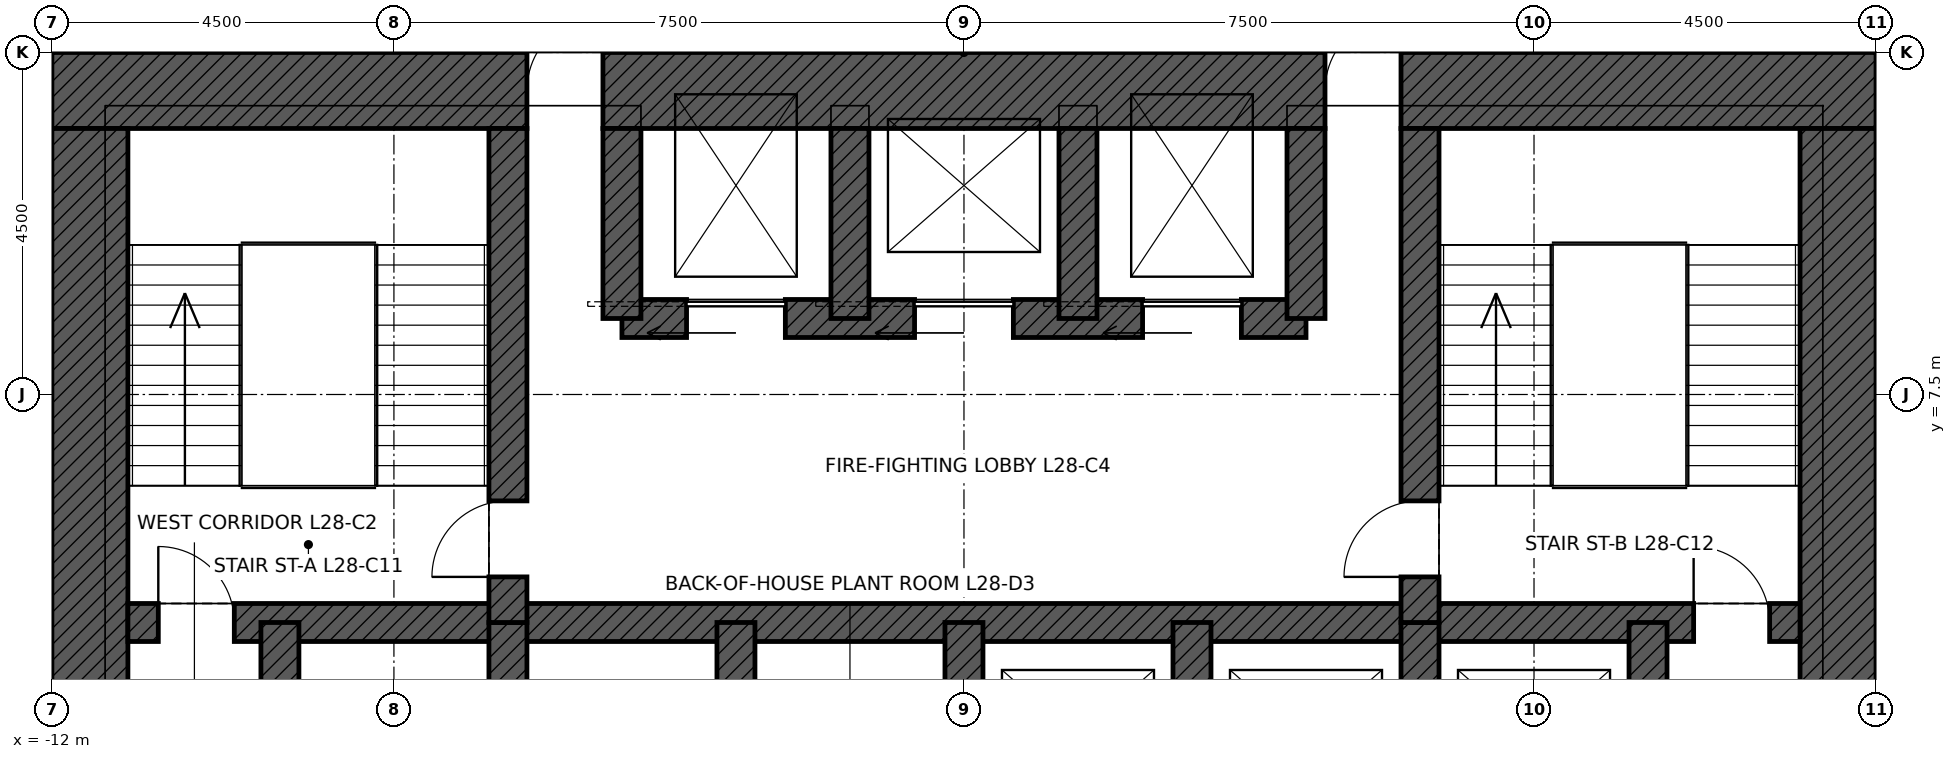
"""IFC4 building model, lengths in metres.
Left out: names, types, materials, properties, quantities, classifications, styles, units other than length and angle.
Written with IfcOpenShell. Run it as: python <this file> out.ifc"""

import sys

from ifc_helpers import new_model, si_unit, direction, frame, frame_2d, origin, place, context, subcontext, project, spatial, rectangle, extrude, element, fill, save


model = new_model("IFC4")
c1 = context("Model", 3, precision=1e-05, world=origin(), true_north=direction((0.0, 1.0)))
c2 = subcontext(c1, "Body", "Model", "MODEL_VIEW")
j1 = project(units=[si_unit("LENGTHUNIT", "METRE"), si_unit("PLANEANGLEUNIT", "RADIAN")], contexts=[c1])
p1 = place(None, origin())
s1 = spatial("IfcSite", under=j1, at=p1, CompositionType="ELEMENT")
p2 = place(p1, origin())
s2 = spatial("IfcBuilding", under=s1, at=p2, CompositionType="ELEMENT")
p3 = place(p2, frame((0.0, 0.0, 140.4)))
s3 = spatial("IfcBuildingStorey", under=s2, at=p3, CompositionType="ELEMENT", Elevation=140.4)
p4 = place(p3, frame((-12.0, 11.5, 0.0), z_axis=(0.0, 0.0, 1.0), x_axis=(1.0, 0.0, 0.0)))
e1 = element("IfcWall", 1, at=p4, inside=s3, PredefinedType="SHEAR", context=c2, shape_type="SweptSolid", body=[
    extrude(rectangle(XDim=24.0, YDim=1.0, at=frame_2d((12.0, 0.0))), origin(), (0.0, 0.0, 1.0), 4.5),
])
p5 = place(p4, frame((6.25, 0.0, 0.0)))
e2 = element("IfcOpeningElement", 2, at=p5, cuts=e1, PredefinedType="OPENING", context=c2, shape_type="SweptSolid", body=[
    extrude(rectangle(XDim=1.0, YDim=2.4, at=frame_2d((0.5, 1.2))), frame((0.0, 0.51, 0.0), z_axis=(0.0, -1.0, 0.0), x_axis=(1.0, 0.0, 0.0)), (0.0, 0.0, 1.0), 1.02),
])
p6 = place(p4, frame((16.75, 0.0, 0.0)))
e3 = element("IfcOpeningElement", 3, at=p6, cuts=e1, PredefinedType="OPENING", context=c2, shape_type="SweptSolid", body=[
    extrude(rectangle(XDim=1.0, YDim=2.4, at=frame_2d((0.5, 1.2))), frame((0.0, 0.51, 0.0), z_axis=(0.0, -1.0, 0.0), x_axis=(1.0, 0.0, 0.0)), (0.0, 0.0, 1.0), 1.02),
])
p7 = place(p3, frame((11.5, 11.0, 0.0), z_axis=(0.0, 0.0, 1.0), x_axis=(0.0, -1.0, 0.0)))
e4 = element("IfcWall", 4, at=p7, inside=s3, PredefinedType="SHEAR", context=c2, shape_type="SweptSolid", body=[
    extrude(rectangle(XDim=22.0, YDim=1.0, at=frame_2d((11.0, 0.0))), origin(), (0.0, 0.0, 1.0), 4.5),
])
p8 = place(p7, frame((10.5, 0.0, 0.0)))
e5 = element("IfcOpeningElement", 5, at=p8, cuts=e4, PredefinedType="OPENING", context=c2, shape_type="SweptSolid", body=[
    extrude(rectangle(XDim=1.0, YDim=2.4, at=frame_2d((0.5, 1.2))), frame((0.0, 0.51, 0.0), z_axis=(0.0, -1.0, 0.0), x_axis=(1.0, 0.0, 0.0)), (0.0, 0.0, 1.0), 1.02),
])
p9 = place(p3, frame((-11.5, -11.0, 0.0), z_axis=(0.0, 0.0, 1.0), x_axis=(0.0, 1.0, 0.0)))
e6 = element("IfcWall", 6, at=p9, inside=s3, PredefinedType="SHEAR", context=c2, shape_type="SweptSolid", body=[
    extrude(rectangle(XDim=22.0, YDim=1.0, at=frame_2d((11.0, 0.0))), origin(), (0.0, 0.0, 1.0), 4.5),
])
p10 = place(p9, frame((10.5, 0.0, 0.0)))
e7 = element("IfcOpeningElement", 7, at=p10, cuts=e6, PredefinedType="OPENING", context=c2, shape_type="SweptSolid", body=[
    extrude(rectangle(XDim=1.0, YDim=2.4, at=frame_2d((0.5, 1.2))), frame((0.0, 0.51, 0.0), z_axis=(0.0, -1.0, 0.0), x_axis=(1.0, 0.0, 0.0)), (0.0, 0.0, 1.0), 1.02),
])
p11 = place(p3, frame((-11.0, 4.5, 0.0), z_axis=(0.0, 0.0, 1.0), x_axis=(1.0, 0.0, 0.0)))
e8 = element("IfcWall", 8, at=p11, inside=s3, PredefinedType="SHEAR", context=c2, shape_type="SweptSolid", body=[
    extrude(rectangle(XDim=22.0, YDim=0.5, at=frame_2d((11.0, 0.0))), origin(), (0.0, 0.0, 1.0), 4.5),
])
p12 = place(p11, frame((0.4, 0.0, 0.0)))
e9 = element("IfcOpeningElement", 9, at=p12, cuts=e8, PredefinedType="OPENING", context=c2, shape_type="SweptSolid", body=[
    extrude(rectangle(XDim=1.0, YDim=2.1, at=frame_2d((0.5, 1.05))), frame((0.0, 0.26, 0.0), z_axis=(0.0, -1.0, 0.0), x_axis=(1.0, 0.0, 0.0)), (0.0, 0.0, 1.0), 0.52),
])
p13 = place(p11, frame((20.6, 0.0, 0.0)))
e10 = element("IfcOpeningElement", 10, at=p13, cuts=e8, PredefinedType="OPENING", context=c2, shape_type="SweptSolid", body=[
    extrude(rectangle(XDim=1.0, YDim=2.1, at=frame_2d((0.5, 1.05))), frame((0.0, 0.26, 0.0), z_axis=(0.0, -1.0, 0.0), x_axis=(1.0, 0.0, 0.0)), (0.0, 0.0, 1.0), 0.52),
])
p14 = place(p3, frame((-4.5, 8.5, 0.0), z_axis=(0.0, 0.0, 1.0), x_axis=(1.0, 0.0, 0.0)))
e11 = element("IfcWall", 11, at=p14, inside=s3, PredefinedType="SHEAR", context=c2, shape_type="SweptSolid", body=[
    extrude(rectangle(XDim=9.0, YDim=0.5, at=frame_2d((4.5, 0.0))), origin(), (0.0, 0.0, 1.0), 4.5),
])
p15 = place(p14, frame((0.85, 0.0, 0.0)))
e12 = element("IfcOpeningElement", 12, at=p15, cuts=e11, PredefinedType="OPENING", context=c2, shape_type="SweptSolid", body=[
    extrude(rectangle(XDim=1.3, YDim=2.4, at=frame_2d((0.65, 1.2))), frame((0.0, 0.26, 0.0), z_axis=(0.0, -1.0, 0.0), x_axis=(1.0, 0.0, 0.0)), (0.0, 0.0, 1.0), 0.52),
])
p16 = place(p14, frame((6.85, 0.0, 0.0)))
e13 = element("IfcOpeningElement", 13, at=p16, cuts=e11, PredefinedType="OPENING", context=c2, shape_type="SweptSolid", body=[
    extrude(rectangle(XDim=1.3, YDim=2.4, at=frame_2d((0.65, 1.2))), frame((0.0, 0.26, 0.0), z_axis=(0.0, -1.0, 0.0), x_axis=(1.0, 0.0, 0.0)), (0.0, 0.0, 1.0), 0.52),
])
p17 = place(p14, frame((3.85, 0.0, 0.0)))
e14 = element("IfcOpeningElement", 14, at=p17, cuts=e11, PredefinedType="OPENING", context=c2, shape_type="SweptSolid", body=[
    extrude(rectangle(XDim=1.3, YDim=2.4, at=frame_2d((0.65, 1.2))), frame((0.0, 0.26, 0.0), z_axis=(0.0, -1.0, 0.0), x_axis=(1.0, 0.0, 0.0)), (0.0, 0.0, 1.0), 0.52),
])
for number, where, z_axis, x_axis in (
    (15, (-9.0, 1.5, 0.0), (0.0, 0.0, 1.0), (0.0, 1.0, 0.0)),
    (16, (9.0, 1.5, 0.0), (0.0, 0.0, 1.0), (0.0, 1.0, 0.0)),
    (17, (-6.0, 1.5, 0.0), (0.0, 0.0, 1.0), (0.0, 1.0, 0.0)),
    (18, (-3.0, 1.5, 0.0), (0.0, 0.0, 1.0), (0.0, 1.0, 0.0)),
    (19, (0.0, 1.5, 0.0), (0.0, 0.0, 1.0), (0.0, 1.0, 0.0)),
    (20, (3.0, 1.5, 0.0), (0.0, 0.0, 1.0), (0.0, 1.0, 0.0)),
    (21, (6.0, 1.5, 0.0), (0.0, 0.0, 1.0), (0.0, 1.0, 0.0)),
):
    element("IfcWall", number, at=place(p3, frame(where, z_axis=z_axis, x_axis=x_axis)), inside=s3, PredefinedType="SHEAR", context=c2, shape_type="SweptSolid", body=[
        extrude(rectangle(XDim=3.0, YDim=0.5, at=frame_2d((1.5, 0.0))), origin(), (0.0, 0.0, 1.0), 4.5),
    ])
p18 = place(p3, frame((-6.0, 4.5, 0.0), z_axis=(0.0, 0.0, 1.0), x_axis=(0.0, 1.0, 0.0)))
e22 = element("IfcWall", 22, at=p18, inside=s3, PredefinedType="SHEAR", context=c2, shape_type="SweptSolid", body=[
    extrude(rectangle(XDim=6.5, YDim=0.5, at=frame_2d((3.25, 0.0))), origin(), (0.0, 0.0, 1.0), 4.5),
])
p19 = place(p18, frame((0.6, 0.0, 0.0)))
e23 = element("IfcOpeningElement", 23, at=p19, cuts=e22, PredefinedType="OPENING", context=c2, shape_type="SweptSolid", body=[
    extrude(rectangle(XDim=1.0, YDim=2.1, at=frame_2d((0.5, 1.05))), frame((0.0, 0.26, 0.0), z_axis=(0.0, -1.0, 0.0), x_axis=(1.0, 0.0, 0.0)), (0.0, 0.0, 1.0), 0.52),
])
p20 = place(p3, frame((6.0, 4.5, 0.0), z_axis=(0.0, 0.0, 1.0), x_axis=(0.0, 1.0, 0.0)))
e24 = element("IfcWall", 24, at=p20, inside=s3, PredefinedType="SHEAR", context=c2, shape_type="SweptSolid", body=[
    extrude(rectangle(XDim=6.5, YDim=0.5, at=frame_2d((3.25, 0.0))), origin(), (0.0, 0.0, 1.0), 4.5),
])
p21 = place(p20, frame((0.6, 0.0, 0.0)))
e25 = element("IfcOpeningElement", 25, at=p21, cuts=e24, PredefinedType="OPENING", context=c2, shape_type="SweptSolid", body=[
    extrude(rectangle(XDim=1.0, YDim=2.1, at=frame_2d((0.5, 1.05))), frame((0.0, 0.26, 0.0), z_axis=(0.0, -1.0, 0.0), x_axis=(1.0, 0.0, 0.0)), (0.0, 0.0, 1.0), 0.52),
])
for number, where, z_axis, x_axis in (
    (26, (-4.5, 8.5, 0.0), (0.0, 0.0, 1.0), (0.0, 1.0, 0.0)),
    (27, (4.5, 8.5, 0.0), (0.0, 0.0, 1.0), (0.0, 1.0, 0.0)),
    (28, (-1.5, 8.5, 0.0), (0.0, 0.0, 1.0), (0.0, 1.0, 0.0)),
    (29, (1.5, 8.5, 0.0), (0.0, 0.0, 1.0), (0.0, 1.0, 0.0)),
):
    element("IfcWall", number, at=place(p3, frame(where, z_axis=z_axis, x_axis=x_axis)), inside=s3, PredefinedType="SHEAR", context=c2, shape_type="SweptSolid", body=[
        extrude(rectangle(XDim=2.5, YDim=0.5, at=frame_2d((1.25, 0.0))), origin(), (0.0, 0.0, 1.0), 4.5),
    ])
p22 = place(p12, origin())
e30 = element("IfcDoor", 30, at=p22, inside=s3, OperationType="SINGLE_SWING_LEFT", PredefinedType="DOOR", context=c2, shape_type="SweptSolid", body=[
    extrude(rectangle(XDim=1.0, YDim=2.1, at=frame_2d((0.5, 1.05))), frame((0.0, 0.025, 0.0), z_axis=(0.0, -1.0, 0.0), x_axis=(1.0, 0.0, 0.0)), (0.0, 0.0, 1.0), 0.05),
])
fill(e9, e30)
p23 = place(p13, origin())
e31 = element("IfcDoor", 31, at=p23, inside=s3, OperationType="SINGLE_SWING_LEFT", PredefinedType="DOOR", context=c2, shape_type="SweptSolid", body=[
    extrude(rectangle(XDim=1.0, YDim=2.1, at=frame_2d((0.5, 1.05))), frame((0.0, 0.025, 0.0), z_axis=(0.0, -1.0, 0.0), x_axis=(1.0, 0.0, 0.0)), (0.0, 0.0, 1.0), 0.05),
])
fill(e10, e31)
p24 = place(p19, origin())
e32 = element("IfcDoor", 32, at=p24, inside=s3, OperationType="SINGLE_SWING_LEFT", PredefinedType="DOOR", context=c2, shape_type="SweptSolid", body=[
    extrude(rectangle(XDim=1.0, YDim=2.1, at=frame_2d((0.5, 1.05))), frame((0.0, 0.025, 0.0), z_axis=(0.0, -1.0, 0.0), x_axis=(1.0, 0.0, 0.0)), (0.0, 0.0, 1.0), 0.05),
])
fill(e23, e32)
p25 = place(p21, origin())
e33 = element("IfcDoor", 33, at=p25, inside=s3, OperationType="SINGLE_SWING_LEFT", PredefinedType="DOOR", context=c2, shape_type="SweptSolid", body=[
    extrude(rectangle(XDim=1.0, YDim=2.1, at=frame_2d((0.5, 1.05))), frame((0.0, 0.025, 0.0), z_axis=(0.0, -1.0, 0.0), x_axis=(1.0, 0.0, 0.0)), (0.0, 0.0, 1.0), 0.05),
])
fill(e25, e33)
p26 = place(p5, origin())
e34 = element("IfcDoor", 34, at=p26, inside=s3, OperationType="SINGLE_SWING_RIGHT", PredefinedType="DOOR", context=c2, shape_type="SweptSolid", body=[
    extrude(rectangle(XDim=1.0, YDim=2.4, at=frame_2d((0.5, 1.2))), frame((0.0, 0.485, 0.0), z_axis=(0.0, -1.0, 0.0), x_axis=(1.0, 0.0, 0.0)), (0.0, 0.0, 1.0), 0.05),
])
fill(e2, e34)
p27 = place(p6, origin())
e35 = element("IfcDoor", 35, at=p27, inside=s3, OperationType="SINGLE_SWING_RIGHT", PredefinedType="DOOR", context=c2, shape_type="SweptSolid", body=[
    extrude(rectangle(XDim=1.0, YDim=2.4, at=frame_2d((0.5, 1.2))), frame((0.0, 0.485, 0.0), z_axis=(0.0, -1.0, 0.0), x_axis=(1.0, 0.0, 0.0)), (0.0, 0.0, 1.0), 0.05),
])
fill(e3, e35)
p28 = place(p15, origin())
e36 = element("IfcDoor", 36, at=p28, inside=s3, OperationType="SLIDING_TO_LEFT", PredefinedType="DOOR", context=c2, shape_type="SweptSolid", body=[
    extrude(rectangle(XDim=1.3, YDim=2.4, at=frame_2d((0.65, 1.2))), frame((0.0, 0.025, 0.0), z_axis=(0.0, -1.0, 0.0), x_axis=(1.0, 0.0, 0.0)), (0.0, 0.0, 1.0), 0.05),
])
fill(e12, e36)
p29 = place(p16, origin())
e37 = element("IfcDoor", 37, at=p29, inside=s3, OperationType="SLIDING_TO_LEFT", PredefinedType="DOOR", context=c2, shape_type="SweptSolid", body=[
    extrude(rectangle(XDim=1.3, YDim=2.4, at=frame_2d((0.65, 1.2))), frame((0.0, 0.025, 0.0), z_axis=(0.0, -1.0, 0.0), x_axis=(1.0, 0.0, 0.0)), (0.0, 0.0, 1.0), 0.05),
])
fill(e13, e37)
p30 = place(p17, origin())
e38 = element("IfcDoor", 38, at=p30, inside=s3, OperationType="SLIDING_TO_LEFT", PredefinedType="DOOR", context=c2, shape_type="SweptSolid", body=[
    extrude(rectangle(XDim=1.3, YDim=2.4, at=frame_2d((0.65, 1.2))), frame((0.0, 0.025, 0.0), z_axis=(0.0, -1.0, 0.0), x_axis=(1.0, 0.0, 0.0)), (0.0, 0.0, 1.0), 0.05),
])
fill(e14, e38)
save(model, sys.argv[1])
